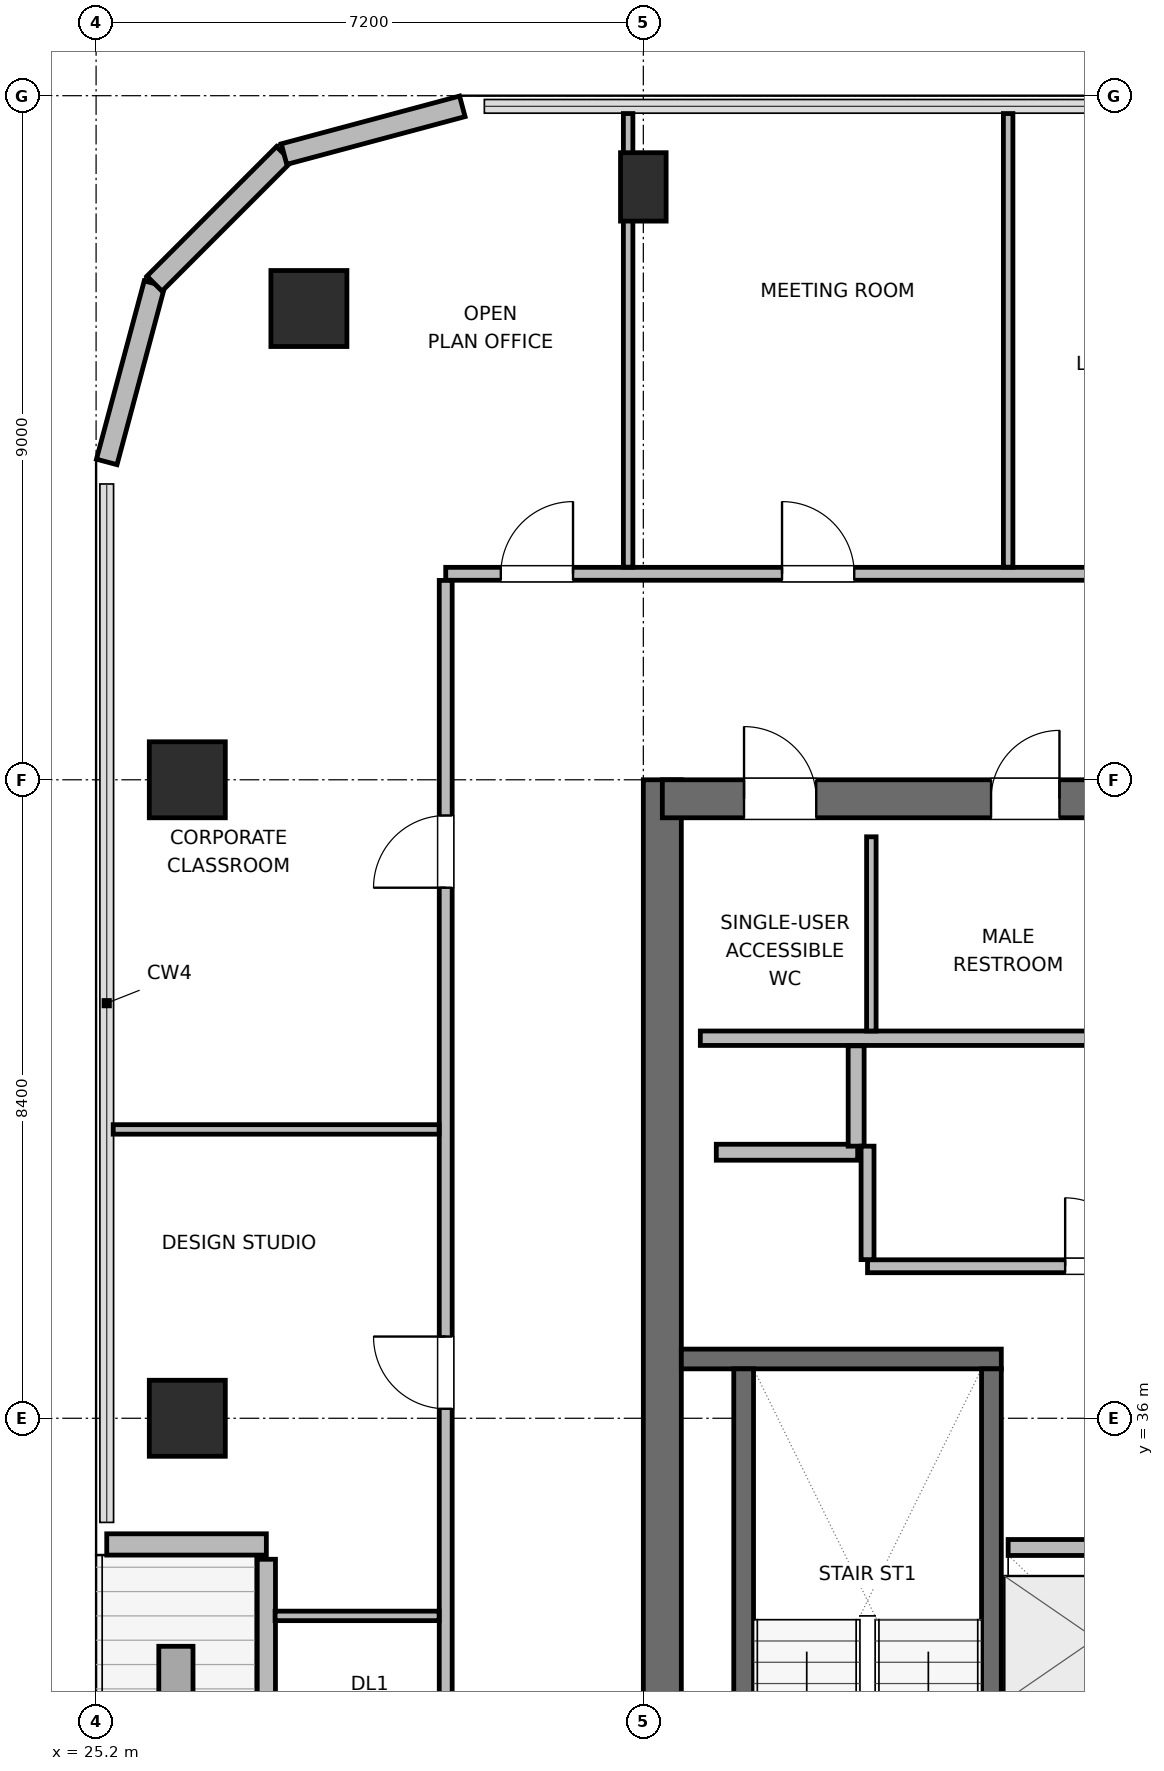
"""IFC4 building model, lengths in metres.
Left out: names, types, materials, properties, quantities, classifications, styles, units other than length and angle.
Written with IfcOpenShell. Run it as: python <this file> out.ifc"""

import sys

from ifc_helpers import new_model, si_unit, direction, frame, frame_2d, origin, origin_2d, place, context, subcontext, project, spatial, rectangle, circle, extrude, element, fill, save


model = new_model("IFC4")
c1 = context("Model", 3, precision=1e-05, world=origin(), true_north=direction((0.0, 1.0)))
c2 = subcontext(c1, "Body", "Model", "MODEL_VIEW")
j1 = project(units=[si_unit("LENGTHUNIT", "METRE"), si_unit("PLANEANGLEUNIT", "RADIAN")], contexts=[c1])
p1 = place(None, origin())
s1 = spatial("IfcSite", under=j1, at=p1, CompositionType="ELEMENT")
p2 = place(p1, origin())
s2 = spatial("IfcBuilding", under=s1, at=p2, CompositionType="ELEMENT")
p3 = place(p2, frame((0.0, 0.0, 262.8)))
s3 = spatial("IfcBuildingStorey", under=s2, at=p3, CompositionType="ELEMENT", Elevation=262.8)
p4 = place(p3, frame((32.65, 27.6, 0.0), z_axis=(0.0, 0.0, 1.0), x_axis=(0.0, 1.0, 0.0)))
e1 = element("IfcWall", 1, at=p4, inside=s3, PredefinedType="SHEAR", context=c2, shape_type="SweptSolid", body=[
    extrude(rectangle(XDim=16.8, YDim=0.5, at=frame_2d((8.4, 0.0))), origin(), (0.0, 0.0, 1.0), 3.9),
])
p5 = place(p3, frame((32.65, 44.15, 0.0), z_axis=(0.0, 0.0, 1.0), x_axis=(1.0, 0.0, 0.0)))
e2 = element("IfcWall", 2, at=p5, inside=s3, PredefinedType="SHEAR", context=c2, shape_type="SweptSolid", body=[
    extrude(rectangle(XDim=9.5, YDim=0.5, at=frame_2d((4.75, 0.0))), origin(), (0.0, 0.0, 1.0), 3.9),
])
p6 = place(p5, frame((1.075, 0.0, 0.0)))
e3 = element("IfcOpeningElement", 3, at=p6, cuts=e2, PredefinedType="OPENING", context=c2, shape_type="SweptSolid", body=[
    extrude(rectangle(XDim=0.95, YDim=2.04, at=frame_2d((0.475, 1.02))), frame((0.0, 0.26, 0.0), z_axis=(0.0, -1.0, 0.0), x_axis=(1.0, 0.0, 0.0)), (0.0, 0.0, 1.0), 0.52),
])
p7 = place(p5, frame((4.325, 0.0, 0.0)))
e4 = element("IfcOpeningElement", 4, at=p7, cuts=e2, PredefinedType="OPENING", context=c2, shape_type="SweptSolid", body=[
    extrude(rectangle(XDim=0.9, YDim=2.02, at=frame_2d((0.45, 1.01))), frame((0.0, 0.26, 0.0), z_axis=(0.0, -1.0, 0.0), x_axis=(1.0, 0.0, 0.0)), (0.0, 0.0, 1.0), 0.52),
])
p8 = place(p5, frame((7.225, 0.0, 0.0)))
e5 = element("IfcOpeningElement", 5, at=p8, cuts=e2, PredefinedType="OPENING", context=c2, shape_type="SweptSolid", body=[
    extrude(rectangle(XDim=0.9, YDim=2.02, at=frame_2d((0.45, 1.01))), frame((0.0, 0.26, 0.0), z_axis=(0.0, -1.0, 0.0), x_axis=(1.0, 0.0, 0.0)), (0.0, 0.0, 1.0), 0.52),
])
p9 = place(p3, frame((32.9, 36.78, 0.0), z_axis=(0.0, 0.0, 1.0), x_axis=(1.0, 0.0, 0.0)))
e6 = element("IfcWall", 6, at=p9, inside=s3, PredefinedType="SHEAR", context=c2, shape_type="SweptSolid", body=[
    extrude(rectangle(XDim=4.21, YDim=0.26, at=frame_2d((2.105, 0.0))), origin(), (0.0, 0.0, 1.0), 3.9),
])
p10 = place(p3, frame((33.72, 29.05, 0.0), z_axis=(0.0, 0.0, 1.0), x_axis=(0.0, 1.0, 0.0)))
e7 = element("IfcWall", 7, at=p10, inside=s3, PredefinedType="SHEAR", context=c2, shape_type="SweptSolid", body=[
    extrude(rectangle(XDim=7.6, YDim=0.26, at=frame_2d((3.8, 0.0))), origin(), (0.0, 0.0, 1.0), 3.9),
])
p11 = place(p3, frame((36.98, 29.05, 0.0), z_axis=(0.0, 0.0, 1.0), x_axis=(0.0, 1.0, 0.0)))
e8 = element("IfcWall", 8, at=p11, inside=s3, PredefinedType="SHEAR", context=c2, shape_type="SweptSolid", body=[
    extrude(rectangle(XDim=7.6, YDim=0.26, at=frame_2d((3.8, 0.0))), origin(), (0.0, 0.0, 1.0), 3.9),
])
p12 = place(p11, frame((0.3, 0.0, 0.0)))
e9 = element("IfcOpeningElement", 9, at=p12, cuts=e8, PredefinedType="OPENING", context=c2, shape_type="SweptSolid", body=[
    extrude(rectangle(XDim=1.0, YDim=2.04, at=frame_2d((0.5, 1.02))), frame((0.0, 0.14, 0.0), z_axis=(0.0, -1.0, 0.0), x_axis=(1.0, 0.0, 0.0)), (0.0, 0.0, 1.0), 0.28),
])
p13 = place(p3, frame((28.0, 50.6, 0.0), z_axis=(0.0, 0.0, 1.0), x_axis=(1.0, 0.0, 0.0)))
e10 = element("IfcColumn", 10, at=p13, inside=s3, PredefinedType="COLUMN", context=c2, shape_type="SweptSolid", body=[
    extrude(circle(Radius=0.5, at=origin_2d()), origin(), (0.0, 0.0, 1.0), 3.9),
])
p14 = place(p3, frame((32.4, 52.2, 0.0), z_axis=(0.0, 0.0, 1.0), x_axis=(1.0, 0.0, 0.0)))
e11 = element("IfcColumn", 11, at=p14, inside=s3, PredefinedType="COLUMN", context=c2, shape_type="SweptSolid", body=[
    extrude(rectangle(XDim=0.6, YDim=0.9, at=origin_2d()), origin(), (0.0, 0.0, 1.0), 3.9),
])
for number, where, z_axis, x_axis in (
    (12, (26.4, 36.0, 0.0), (0.0, 0.0, 1.0), (1.0, 0.0, 0.0)),
    (13, (26.4, 44.4, 0.0), (0.0, 0.0, 1.0), (1.0, 0.0, 0.0)),
):
    element("IfcColumn", number, at=place(p3, frame(where, z_axis=z_axis, x_axis=x_axis)), inside=s3, PredefinedType="COLUMN", context=c2, shape_type="SweptSolid", body=[
        extrude(rectangle(XDim=1.0, YDim=1.0, at=origin_2d()), origin(), (0.0, 0.0, 1.0), 3.9),
    ])
p15 = place(p3, frame((27.44, 29.455, 0.0), z_axis=(0.0, 0.0, 1.0), x_axis=(0.0, 1.0, 0.0)))
e14 = element("IfcWall", 14, at=p15, inside=s3, PredefinedType="SOLIDWALL", context=c2, shape_type="SweptSolid", body=[
    extrude(rectangle(XDim=4.69, YDim=0.24, at=frame_2d((2.345, 0.0))), origin(), (0.0, 0.0, 1.0), 3.311),
])
p16 = place(p15, frame((1.845, 0.0, 0.0)))
e15 = element("IfcOpeningElement", 15, at=p16, cuts=e14, PredefinedType="OPENING", context=c2, shape_type="SweptSolid", body=[
    extrude(rectangle(XDim=1.0, YDim=2.02, at=frame_2d((0.5, 1.01))), frame((0.0, 0.13, 0.0), z_axis=(0.0, -1.0, 0.0), x_axis=(1.0, 0.0, 0.0)), (0.0, 0.0, 1.0), 0.26),
])
p17 = place(p3, frame((27.44, 34.34, 0.0), z_axis=(0.0, 0.0, 1.0), x_axis=(-1.0, 0.0, 0.0)))
e16 = element("IfcWall", 16, at=p17, inside=s3, PredefinedType="SOLIDWALL", context=c2, shape_type="SweptSolid", body=[
    extrude(rectangle(XDim=2.1, YDim=0.28, at=frame_2d((1.05, 0.0))), origin(), (0.0, 0.0, 1.0), 3.126),
])
p18 = place(p3, frame((25.34, 48.582, 0.0), z_axis=(0.0, 0.0, 1.0), x_axis=(0.258751159445, 0.965944013639, 0.0)))
e17 = element("IfcWall", 17, at=p18, inside=s3, PredefinedType="SOLIDWALL", context=c2, shape_type="SweptSolid", body=[
    extrude(rectangle(XDim=2.429, YDim=0.28, at=frame_2d((1.214, 0.0))), origin(), (0.0, 0.0, 1.0), 3.68),
])
p19 = place(p3, frame((25.969, 50.927, 0.0), z_axis=(0.0, 0.0, 1.0), x_axis=(0.707106781187, 0.707106781187, 0.0)))
e18 = element("IfcWall", 18, at=p19, inside=s3, PredefinedType="SOLIDWALL", context=c2, shape_type="SweptSolid", body=[
    extrude(rectangle(XDim=2.41, YDim=0.28, at=frame_2d((1.205, 0.0))), origin(), (0.0, 0.0, 1.0), 3.68),
])
p20 = place(p3, frame((27.673, 52.632, 0.0), z_axis=(0.0, 0.0, 1.0), x_axis=(0.965937282298, 0.25877628691, 0.0)))
e19 = element("IfcWall", 19, at=p20, inside=s3, PredefinedType="SOLIDWALL", context=c2, shape_type="SweptSolid", body=[
    extrude(rectangle(XDim=2.428, YDim=0.28, at=frame_2d((1.214, 0.0))), origin(), (0.0, 0.0, 1.0), 3.68),
])
p21 = place(p3, frame((33.15, 41.0, 0.0), z_axis=(0.0, 0.0, 1.0), x_axis=(1.0, 0.0, 0.0)))
e20 = element("IfcWall", 20, at=p21, inside=s3, PredefinedType="PLUMBINGWALL", context=c2, shape_type="SweptSolid", body=[
    extrude(rectangle(XDim=8.5, YDim=0.19, at=frame_2d((4.25, 0.0))), origin(), (0.0, 0.0, 1.0), 3.68),
])
p22 = place(p3, frame((35.4, 41.095, 0.0), z_axis=(0.0, 0.0, 1.0), x_axis=(0.0, 1.0, 0.0)))
e21 = element("IfcWall", 21, at=p22, inside=s3, PredefinedType="PARTITIONING", context=c2, shape_type="SweptSolid", body=[
    extrude(rectangle(XDim=2.555, YDim=0.125, at=frame_2d((1.277, 0.0))), origin(), (0.0, 0.0, 1.0), 3.68),
])
p23 = place(p3, frame((33.36, 39.5, 0.0), z_axis=(0.0, 0.0, 1.0), x_axis=(1.0, 0.0, 0.0)))
e22 = element("IfcWall", 22, at=p23, inside=s3, PredefinedType="PARTITIONING", context=c2, shape_type="SweptSolid", body=[
    extrude(rectangle(XDim=1.86, YDim=0.21, at=frame_2d((0.93, 0.0))), origin(), (0.0, 0.0, 1.0), 3.68),
])
p24 = place(p3, frame((35.2, 39.58, 0.0), z_axis=(0.0, 0.0, 1.0), x_axis=(0.0, 1.0, 0.0)))
e23 = element("IfcWall", 23, at=p24, inside=s3, PredefinedType="PARTITIONING", context=c2, shape_type="SweptSolid", body=[
    extrude(rectangle(XDim=1.32, YDim=0.21, at=frame_2d((0.66, 0.0))), origin(), (0.0, 0.0, 1.0), 3.68),
])
p25 = place(p3, frame((37.2, 34.3, 0.0), z_axis=(0.0, 0.0, 1.0), x_axis=(1.0, 0.0, 0.0)))
e24 = element("IfcWall", 24, at=p25, inside=s3, PredefinedType="PARTITIONING", context=c2, shape_type="SweptSolid", body=[
    extrude(rectangle(XDim=2.3, YDim=0.21, at=frame_2d((1.15, 0.0))), origin(), (0.0, 0.0, 1.0), 3.68),
])
p26 = place(p3, frame((35.35, 38.0, 0.0), z_axis=(0.0, 0.0, 1.0), x_axis=(1.0, 0.0, 0.0)))
e25 = element("IfcWall", 25, at=p26, inside=s3, PredefinedType="PARTITIONING", context=c2, shape_type="SweptSolid", body=[
    extrude(rectangle(XDim=6.1, YDim=0.17, at=frame_2d((3.05, 0.0))), origin(), (0.0, 0.0, 1.0), 3.68),
])
p27 = place(p26, frame((2.6, 0.0, 0.0)))
e26 = element("IfcOpeningElement", 26, at=p27, cuts=e25, PredefinedType="OPENING", context=c2, shape_type="SweptSolid", body=[
    extrude(rectangle(XDim=0.9, YDim=2.02, at=frame_2d((0.45, 1.01))), frame((0.0, 0.095, 0.0), z_axis=(0.0, -1.0, 0.0), x_axis=(1.0, 0.0, 0.0)), (0.0, 0.0, 1.0), 0.19),
])
p28 = place(p3, frame((35.35, 38.087, 0.0), z_axis=(0.0, 0.0, 1.0), x_axis=(0.0, 1.0, 0.0)))
e27 = element("IfcWall", 27, at=p28, inside=s3, PredefinedType="PARTITIONING", context=c2, shape_type="SweptSolid", body=[
    extrude(rectangle(XDim=1.493, YDim=0.17, at=frame_2d((0.747, 0.0))), origin(), (0.0, 0.0, 1.0), 3.68),
])
p29 = place(p3, frame((29.8, 47.11, 0.0), z_axis=(0.0, 0.0, 1.0), x_axis=(1.0, 0.0, 0.0)))
e28 = element("IfcWall", 28, at=p29, inside=s3, PredefinedType="PARTITIONING", context=c2, shape_type="SweptSolid", body=[
    extrude(rectangle(XDim=33.8, YDim=0.17, at=frame_2d((16.9, 0.0))), origin(), (0.0, 0.0, 1.0), 3.68),
])
p30 = place(p29, frame((0.725, 0.0, 0.0)))
e29 = element("IfcOpeningElement", 29, at=p30, cuts=e28, PredefinedType="OPENING", context=c2, shape_type="SweptSolid", body=[
    extrude(rectangle(XDim=0.95, YDim=2.04, at=frame_2d((0.475, 1.02))), frame((0.0, 0.095, 0.0), z_axis=(0.0, -1.0, 0.0), x_axis=(1.0, 0.0, 0.0)), (0.0, 0.0, 1.0), 0.19),
])
p31 = place(p29, frame((4.425, 0.0, 0.0)))
e30 = element("IfcOpeningElement", 30, at=p31, cuts=e28, PredefinedType="OPENING", context=c2, shape_type="SweptSolid", body=[
    extrude(rectangle(XDim=0.95, YDim=2.04, at=frame_2d((0.475, 1.02))), frame((0.0, 0.095, 0.0), z_axis=(0.0, -1.0, 0.0), x_axis=(1.0, 0.0, 0.0)), (0.0, 0.0, 1.0), 0.19),
])
p32 = place(p29, frame((9.425, 0.0, 0.0)))
e31 = element("IfcOpeningElement", 31, at=p32, cuts=e28, PredefinedType="OPENING", context=c2, shape_type="SweptSolid", body=[
    extrude(rectangle(XDim=0.95, YDim=2.04, at=frame_2d((0.475, 1.02))), frame((0.0, 0.095, 0.0), z_axis=(0.0, -1.0, 0.0), x_axis=(1.0, 0.0, 0.0)), (0.0, 0.0, 1.0), 0.19),
])
p33 = place(p29, frame((14.925, 0.0, 0.0)))
e32 = element("IfcOpeningElement", 32, at=p33, cuts=e28, PredefinedType="OPENING", context=c2, shape_type="SweptSolid", body=[
    extrude(rectangle(XDim=0.95, YDim=2.04, at=frame_2d((0.475, 1.02))), frame((0.0, 0.095, 0.0), z_axis=(0.0, -1.0, 0.0), x_axis=(1.0, 0.0, 0.0)), (0.0, 0.0, 1.0), 0.19),
])
p34 = place(p29, frame((20.925, 0.0, 0.0)))
e33 = element("IfcOpeningElement", 33, at=p34, cuts=e28, PredefinedType="OPENING", context=c2, shape_type="SweptSolid", body=[
    extrude(rectangle(XDim=0.95, YDim=2.04, at=frame_2d((0.475, 1.02))), frame((0.0, 0.095, 0.0), z_axis=(0.0, -1.0, 0.0), x_axis=(1.0, 0.0, 0.0)), (0.0, 0.0, 1.0), 0.19),
])
p35 = place(p29, frame((26.725, 0.0, 0.0)))
e34 = element("IfcOpeningElement", 34, at=p35, cuts=e28, PredefinedType="OPENING", context=c2, shape_type="SweptSolid", body=[
    extrude(rectangle(XDim=0.95, YDim=2.04, at=frame_2d((0.475, 1.02))), frame((0.0, 0.095, 0.0), z_axis=(0.0, -1.0, 0.0), x_axis=(1.0, 0.0, 0.0)), (0.0, 0.0, 1.0), 0.19),
])
p36 = place(p29, frame((31.425, 0.0, 0.0)))
e35 = element("IfcOpeningElement", 35, at=p36, cuts=e28, PredefinedType="OPENING", context=c2, shape_type="SweptSolid", body=[
    extrude(rectangle(XDim=0.95, YDim=2.04, at=frame_2d((0.475, 1.02))), frame((0.0, 0.095, 0.0), z_axis=(0.0, -1.0, 0.0), x_axis=(1.0, 0.0, 0.0)), (0.0, 0.0, 1.0), 0.19),
])
p37 = place(p3, frame((29.8, 24.977, 0.0), z_axis=(0.0, 0.0, 1.0), x_axis=(0.0, 1.0, 0.0)))
e36 = element("IfcWall", 36, at=p37, inside=s3, PredefinedType="PARTITIONING", context=c2, shape_type="SweptSolid", body=[
    extrude(rectangle(XDim=22.046, YDim=0.17, at=frame_2d((11.023, 0.0))), origin(), (0.0, 0.0, 1.0), 3.68),
])
p38 = place(p37, frame((3.693, 0.0, 0.0)))
e37 = element("IfcOpeningElement", 37, at=p38, cuts=e36, PredefinedType="OPENING", context=c2, shape_type="SweptSolid", body=[
    extrude(rectangle(XDim=0.95, YDim=2.04, at=frame_2d((0.475, 1.02))), frame((0.0, 0.095, 0.0), z_axis=(0.0, -1.0, 0.0), x_axis=(1.0, 0.0, 0.0)), (0.0, 0.0, 1.0), 0.19),
])
p39 = place(p37, frame((11.148, 0.0, 0.0)))
e38 = element("IfcOpeningElement", 38, at=p39, cuts=e36, PredefinedType="OPENING", context=c2, shape_type="SweptSolid", body=[
    extrude(rectangle(XDim=0.95, YDim=2.04, at=frame_2d((0.475, 1.02))), frame((0.0, 0.095, 0.0), z_axis=(0.0, -1.0, 0.0), x_axis=(1.0, 0.0, 0.0)), (0.0, 0.0, 1.0), 0.19),
])
p40 = place(p37, frame((18.003, 0.0, 0.0)))
e39 = element("IfcOpeningElement", 39, at=p40, cuts=e36, PredefinedType="OPENING", context=c2, shape_type="SweptSolid", body=[
    extrude(rectangle(XDim=0.95, YDim=2.04, at=frame_2d((0.475, 1.02))), frame((0.0, 0.095, 0.0), z_axis=(0.0, -1.0, 0.0), x_axis=(1.0, 0.0, 0.0)), (0.0, 0.0, 1.0), 0.19),
])
p41 = place(p3, frame((32.2, 47.197, 0.0), z_axis=(0.0, 0.0, 1.0), x_axis=(0.0, 1.0, 0.0)))
e40 = element("IfcWall", 40, at=p41, inside=s3, PredefinedType="PARTITIONING", context=c2, shape_type="SweptSolid", body=[
    extrude(rectangle(XDim=5.968, YDim=0.125, at=frame_2d((2.984, 0.0))), origin(), (0.0, 0.0, 1.0), 3.054),
])
p42 = place(p3, frame((37.2, 47.197, 0.0), z_axis=(0.0, 0.0, 1.0), x_axis=(0.0, 1.0, 0.0)))
e41 = element("IfcWall", 41, at=p42, inside=s3, PredefinedType="PARTITIONING", context=c2, shape_type="SweptSolid", body=[
    extrude(rectangle(XDim=5.968, YDim=0.125, at=frame_2d((2.984, 0.0))), origin(), (0.0, 0.0, 1.0), 3.68),
])
p43 = place(p3, frame((27.555, 33.4, 0.0), z_axis=(0.0, 0.0, 1.0), x_axis=(1.0, 0.0, 0.0)))
e42 = element("IfcWall", 42, at=p43, inside=s3, PredefinedType="PARTITIONING", context=c2, shape_type="SweptSolid", body=[
    extrude(rectangle(XDim=2.158, YDim=0.125, at=frame_2d((1.079, 0.0))), origin(), (0.0, 0.0, 1.0), 3.68),
])
p44 = place(p3, frame((25.425, 39.8, 0.0), z_axis=(0.0, 0.0, 1.0), x_axis=(1.0, 0.0, 0.0)))
e43 = element("IfcWall", 43, at=p44, inside=s3, PredefinedType="PARTITIONING", context=c2, shape_type="SweptSolid", body=[
    extrude(rectangle(XDim=4.288, YDim=0.125, at=frame_2d((2.144, 0.0))), origin(), (0.0, 0.0, 1.0), 3.68),
])
p45 = place(p6, origin())
e44 = element("IfcDoor", 44, at=p45, inside=s3, OperationType="SINGLE_SWING_LEFT", PredefinedType="DOOR", context=c2, shape_type="SweptSolid", body=[
    extrude(rectangle(XDim=0.95, YDim=2.04, at=frame_2d((0.475, 1.02))), frame((0.0, 0.025, 0.0), z_axis=(0.0, -1.0, 0.0), x_axis=(1.0, 0.0, 0.0)), (0.0, 0.0, 1.0), 0.05),
])
fill(e3, e44)
p46 = place(p7, origin())
e45 = element("IfcDoor", 45, at=p46, inside=s3, OperationType="SINGLE_SWING_RIGHT", PredefinedType="DOOR", context=c2, shape_type="SweptSolid", body=[
    extrude(rectangle(XDim=0.9, YDim=2.02, at=frame_2d((0.45, 1.01))), frame((0.0, 0.025, 0.0), z_axis=(0.0, -1.0, 0.0), x_axis=(1.0, 0.0, 0.0)), (0.0, 0.0, 1.0), 0.05),
])
fill(e4, e45)
p47 = place(p27, origin())
e46 = element("IfcDoor", 46, at=p47, inside=s3, OperationType="SINGLE_SWING_LEFT", PredefinedType="DOOR", context=c2, shape_type="SweptSolid", body=[
    extrude(rectangle(XDim=0.9, YDim=2.02, at=frame_2d((0.45, 1.01))), frame((0.0, 0.025, 0.0), z_axis=(0.0, -1.0, 0.0), x_axis=(1.0, 0.0, 0.0)), (0.0, 0.0, 1.0), 0.05),
])
fill(e26, e46)
p48 = place(p30, origin())
e47 = element("IfcDoor", 47, at=p48, inside=s3, OperationType="SINGLE_SWING_RIGHT", PredefinedType="DOOR", context=c2, shape_type="SweptSolid", body=[
    extrude(rectangle(XDim=0.95, YDim=2.04, at=frame_2d((0.475, 1.02))), frame((0.0, 0.025, 0.0), z_axis=(0.0, -1.0, 0.0), x_axis=(1.0, 0.0, 0.0)), (0.0, 0.0, 1.0), 0.05),
])
fill(e29, e47)
p49 = place(p31, origin())
e48 = element("IfcDoor", 48, at=p49, inside=s3, OperationType="SINGLE_SWING_LEFT", PredefinedType="DOOR", context=c2, shape_type="SweptSolid", body=[
    extrude(rectangle(XDim=0.95, YDim=2.04, at=frame_2d((0.475, 1.02))), frame((0.0, 0.025, 0.0), z_axis=(0.0, -1.0, 0.0), x_axis=(1.0, 0.0, 0.0)), (0.0, 0.0, 1.0), 0.05),
])
fill(e30, e48)
p50 = place(p39, origin())
e49 = element("IfcDoor", 49, at=p50, inside=s3, OperationType="SINGLE_SWING_RIGHT", PredefinedType="DOOR", context=c2, shape_type="SweptSolid", body=[
    extrude(rectangle(XDim=0.95, YDim=2.04, at=frame_2d((0.475, 1.02))), frame((0.0, 0.025, 0.0), z_axis=(0.0, -1.0, 0.0), x_axis=(1.0, 0.0, 0.0)), (0.0, 0.0, 1.0), 0.05),
])
fill(e38, e49)
p51 = place(p40, origin())
e50 = element("IfcDoor", 50, at=p51, inside=s3, OperationType="SINGLE_SWING_LEFT", PredefinedType="DOOR", context=c2, shape_type="SweptSolid", body=[
    extrude(rectangle(XDim=0.95, YDim=2.04, at=frame_2d((0.475, 1.02))), frame((0.0, 0.025, 0.0), z_axis=(0.0, -1.0, 0.0), x_axis=(1.0, 0.0, 0.0)), (0.0, 0.0, 1.0), 0.05),
])
fill(e39, e50)
save(model, sys.argv[1])
